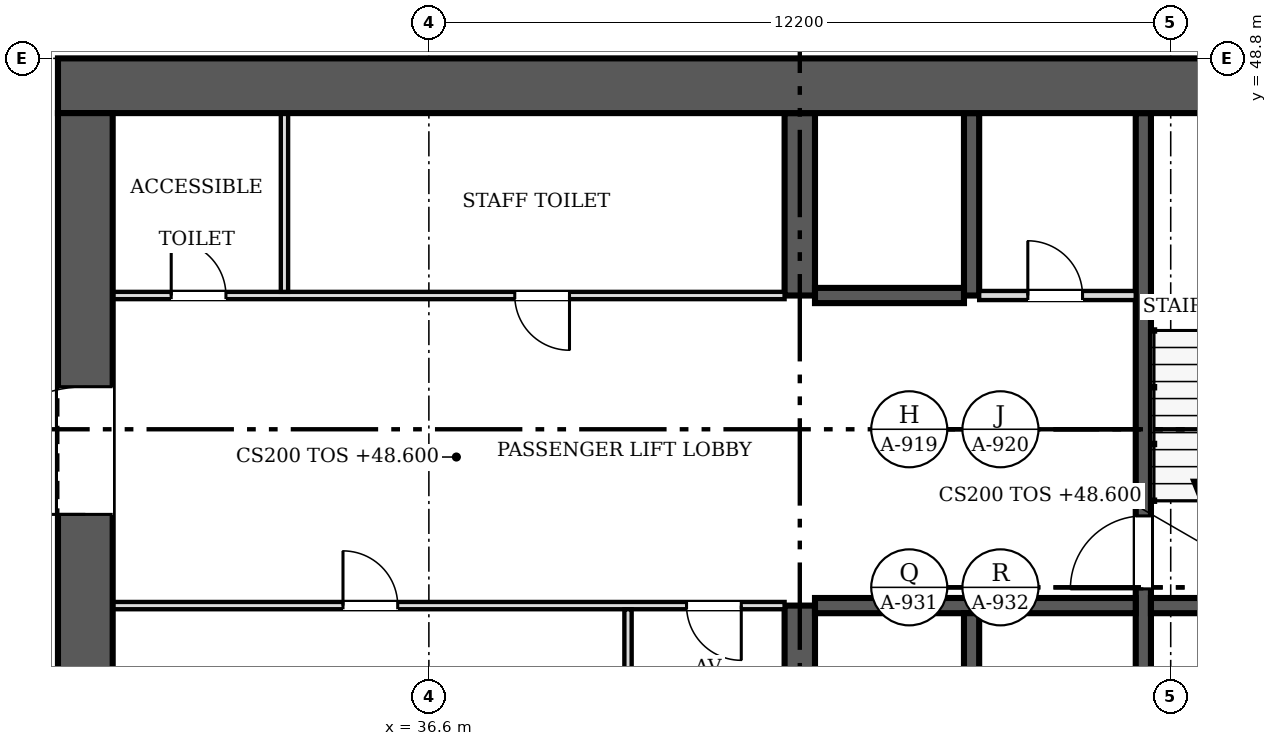
"""IFC4 building model, lengths in metres.
Left out: names, types, materials, properties, quantities, classifications, styles, units other than length and angle.
Written with IfcOpenShell. Run it as: python <this file> out.ifc"""

import sys

from ifc_helpers import new_model, si_unit, direction, frame, frame_2d, origin, place, context, subcontext, project, spatial, rectangle, extrude, source, transform, mapped, element, fill, save


model = new_model("IFC4")
c1 = context("Model", 3, precision=1e-05, world=origin(), true_north=direction((0.0, 1.0)))
c2 = subcontext(c1, "Body", "Model", "MODEL_VIEW")
j1 = project(units=[si_unit("LENGTHUNIT", "METRE"), si_unit("PLANEANGLEUNIT", "RADIAN")], contexts=[c1])
p1 = place(None, origin())
s1 = spatial("IfcSite", under=j1, at=p1, CompositionType="ELEMENT")
p2 = place(p1, origin())
s2 = spatial("IfcBuilding", under=s1, at=p2, CompositionType="ELEMENT")
p3 = place(p2, frame((0.0, 0.0, 48.6)))
s3 = spatial("IfcBuildingStorey", under=s2, at=p3, CompositionType="ELEMENT", Elevation=48.6)
p4 = place(p3, frame((30.95, 25.3, 0.0), z_axis=(0.0, 0.0, 1.0), x_axis=(0.0, 1.0, 0.0)))
e1 = element("IfcWall", 1, at=p4, inside=s3, PredefinedType="SHEAR", context=c2, shape_type="SweptSolid", body=[
    extrude(rectangle(XDim=22.6, YDim=0.9, at=frame_2d((11.3, 0.0))), origin(), (0.0, 0.0, 1.0), 3.8),
])
m1 = source(origin(), c2, "Body", "SweptSolid", [
    extrude(rectangle(XDim=2.1, YDim=2.4, at=frame_2d((1.05, 1.2))), frame((0.0, 0.46, 0.0), z_axis=(0.0, -1.0, 0.0), x_axis=(1.0, 0.0, 0.0)), (0.0, 0.0, 1.0), 0.92),
])
p5 = place(p4, frame((4.5, 0.0, 0.0)))
e2 = element("IfcOpeningElement", 2, at=p5, cuts=e1, PredefinedType="OPENING", context=c2, shape_type="MappedRepresentation", body=[
    mapped(m1, transform((0.0, 0.0, 0.0), scale=1.0)),
])
p6 = place(p4, frame((16.0, 0.0, 0.0)))
e3 = element("IfcOpeningElement", 3, at=p6, cuts=e1, PredefinedType="OPENING", context=c2, shape_type="MappedRepresentation", body=[
    mapped(m1, transform((0.0, 0.0, 0.0), scale=1.0)),
])
p7 = place(p3, frame((30.5, 48.35, 0.0), z_axis=(0.0, 0.0, 1.0), x_axis=(1.0, 0.0, 0.0)))
e4 = element("IfcWall", 4, at=p7, inside=s3, PredefinedType="SHEAR", context=c2, shape_type="SweptSolid", body=[
    extrude(rectangle(XDim=24.4, YDim=0.9, at=frame_2d((12.2, 0.0))), origin(), (0.0, 0.0, 1.0), 3.8),
])
p8 = place(p3, frame((42.7, 36.85, 0.0), z_axis=(0.0, 0.0, 1.0), x_axis=(0.0, 1.0, 0.0)))
e5 = element("IfcWall", 5, at=p8, inside=s3, PredefinedType="SHEAR", context=c2, shape_type="SweptSolid", body=[
    extrude(rectangle(XDim=2.95, YDim=0.5, at=frame_2d((1.475, 0.0))), origin(), (0.0, 0.0, 1.0), 3.8),
])
p9 = place(p3, frame((42.7, 44.9, 0.0), z_axis=(0.0, 0.0, 1.0), x_axis=(0.0, 1.0, 0.0)))
e6 = element("IfcWall", 6, at=p9, inside=s3, PredefinedType="SHEAR", context=c2, shape_type="SweptSolid", body=[
    extrude(rectangle(XDim=3.0, YDim=0.5, at=frame_2d((1.5, 0.0))), origin(), (0.0, 0.0, 1.0), 3.8),
])
p10 = place(p3, frame((48.35, 47.9, 0.0), z_axis=(0.0, 0.0, 1.0), x_axis=(0.0, -1.0, 0.0)))
e7 = element("IfcWall", 7, at=p10, inside=s3, PredefinedType="SOLIDWALL", context=c2, shape_type="SweptSolid", body=[
    extrude(rectangle(XDim=11.05, YDim=0.25, at=frame_2d((5.525, 0.0))), origin(), (0.0, 0.0, 1.0), 3.8),
])
m2 = source(origin(), c2, "Body", "SweptSolid", [
    extrude(rectangle(XDim=1.2, YDim=2.1, at=frame_2d((0.6, 1.05))), frame((0.0, 0.135, 0.0), z_axis=(0.0, -1.0, 0.0), x_axis=(1.0, 0.0, 0.0)), (0.0, 0.0, 1.0), 0.27),
])
p11 = place(p10, frame((6.625, 0.0, 0.0)))
e8 = element("IfcOpeningElement", 8, at=p11, cuts=e7, PredefinedType="OPENING", context=c2, shape_type="MappedRepresentation", body=[
    mapped(m2, transform((0.0, 0.0, 0.0), scale=1.0)),
])
p12 = place(p3, frame((42.95, 39.8, 0.0), z_axis=(0.0, 0.0, 1.0), x_axis=(1.0, 0.0, 0.0)))
e9 = element("IfcWall", 9, at=p12, inside=s3, PredefinedType="SOLIDWALL", context=c2, shape_type="SweptSolid", body=[
    extrude(rectangle(XDim=5.275, YDim=0.25, at=frame_2d((2.638, 0.0))), origin(), (0.0, 0.0, 1.0), 3.8),
])
p13 = place(p3, frame((48.475, 39.8, 0.0), z_axis=(0.0, 0.0, 1.0), x_axis=(1.0, 0.0, 0.0)))
e10 = element("IfcWall", 10, at=p13, inside=s3, PredefinedType="SOLIDWALL", context=c2, shape_type="SweptSolid", body=[
    extrude(rectangle(XDim=3.525, YDim=0.25, at=frame_2d((1.762, 0.0))), origin(), (0.0, 0.0, 1.0), 3.8),
])
p14 = place(p3, frame((45.525, 36.85, 0.0), z_axis=(0.0, 0.0, 1.0), x_axis=(0.0, 1.0, 0.0)))
e11 = element("IfcWall", 11, at=p14, inside=s3, PredefinedType="SOLIDWALL", context=c2, shape_type="SweptSolid", body=[
    extrude(rectangle(XDim=2.825, YDim=0.25, at=frame_2d((1.413, 0.0))), origin(), (0.0, 0.0, 1.0), 3.8),
])
p15 = place(p3, frame((45.525, 44.9, 0.0), z_axis=(0.0, 0.0, 1.0), x_axis=(0.0, 1.0, 0.0)))
e12 = element("IfcWall", 12, at=p15, inside=s3, PredefinedType="SOLIDWALL", context=c2, shape_type="SweptSolid", body=[
    extrude(rectangle(XDim=3.0, YDim=0.25, at=frame_2d((1.5, 0.0))), origin(), (0.0, 0.0, 1.0), 3.8),
])
p16 = place(p3, frame((42.95, 44.9, 0.0), z_axis=(0.0, 0.0, 1.0), x_axis=(1.0, 0.0, 0.0)))
e13 = element("IfcWall", 13, at=p16, inside=s3, PredefinedType="SOLIDWALL", context=c2, shape_type="SweptSolid", body=[
    extrude(rectangle(XDim=2.45, YDim=0.25, at=frame_2d((1.225, 0.0))), origin(), (0.0, 0.0, 1.0), 3.8),
])
p17 = place(p3, frame((42.45, 39.8, 0.0), z_axis=(0.0, 0.0, 1.0), x_axis=(-1.0, 0.0, 0.0)))
e14 = element("IfcWall", 14, at=p17, inside=s3, PredefinedType="PARTITIONING", context=c2, shape_type="SweptSolid", body=[
    extrude(rectangle(XDim=11.05, YDim=0.12, at=frame_2d((5.525, 0.0))), origin(), (0.0, 0.0, 1.0), 3.6),
])
m3 = source(origin(), c2, "Body", "SweptSolid", [
    extrude(rectangle(XDim=0.9, YDim=2.1, at=frame_2d((0.45, 1.05))), frame((0.0, 0.07, 0.0), z_axis=(0.0, -1.0, 0.0), x_axis=(1.0, 0.0, 0.0)), (0.0, 0.0, 1.0), 0.14),
])
p18 = place(p17, frame((6.363, 0.0, 0.0)))
e15 = element("IfcOpeningElement", 15, at=p18, cuts=e14, PredefinedType="OPENING", context=c2, shape_type="MappedRepresentation", body=[
    mapped(m3, transform((0.0, 0.0, 0.0), scale=1.0)),
])
p19 = place(p17, frame((0.712, 0.0, 0.0)))
e16 = element("IfcOpeningElement", 16, at=p19, cuts=e14, PredefinedType="OPENING", context=c2, shape_type="MappedRepresentation", body=[
    mapped(m3, transform((0.0, 0.0, 0.0), scale=1.0)),
])
p20 = place(p3, frame((31.4, 44.9, 0.0), z_axis=(0.0, 0.0, 1.0), x_axis=(1.0, 0.0, 0.0)))
e17 = element("IfcWall", 17, at=p20, inside=s3, PredefinedType="PARTITIONING", context=c2, shape_type="SweptSolid", body=[
    extrude(rectangle(XDim=11.05, YDim=0.12, at=frame_2d((5.525, 0.0))), origin(), (0.0, 0.0, 1.0), 3.6),
])
p21 = place(p20, frame((0.962, 0.0, 0.0)))
e18 = element("IfcOpeningElement", 18, at=p21, cuts=e17, PredefinedType="OPENING", context=c2, shape_type="MappedRepresentation", body=[
    mapped(m3, transform((0.0, 0.0, 0.0), scale=1.0)),
])
p22 = place(p20, frame((6.613, 0.0, 0.0)))
e19 = element("IfcOpeningElement", 19, at=p22, cuts=e17, PredefinedType="OPENING", context=c2, shape_type="MappedRepresentation", body=[
    mapped(m3, transform((0.0, 0.0, 0.0), scale=1.0)),
])
p23 = place(p3, frame((39.875, 36.85, 0.0), z_axis=(0.0, 0.0, 1.0), x_axis=(0.0, 1.0, 0.0)))
e20 = element("IfcWall", 20, at=p23, inside=s3, PredefinedType="PARTITIONING", context=c2, shape_type="SweptSolid", body=[
    extrude(rectangle(XDim=2.89, YDim=0.12, at=frame_2d((1.445, 0.0))), origin(), (0.0, 0.0, 1.0), 3.6),
])
p24 = place(p3, frame((34.225, 44.96, 0.0), z_axis=(0.0, 0.0, 1.0), x_axis=(0.0, 1.0, 0.0)))
e21 = element("IfcWall", 21, at=p24, inside=s3, PredefinedType="PARTITIONING", context=c2, shape_type="SweptSolid", body=[
    extrude(rectangle(XDim=2.94, YDim=0.12, at=frame_2d((1.47, 0.0))), origin(), (0.0, 0.0, 1.0), 3.6),
])
p25 = place(p3, frame((45.65, 44.9, 0.0), z_axis=(0.0, 0.0, 1.0), x_axis=(1.0, 0.0, 0.0)))
e22 = element("IfcWall", 22, at=p25, inside=s3, PredefinedType="PARTITIONING", context=c2, shape_type="SweptSolid", body=[
    extrude(rectangle(XDim=2.575, YDim=0.15, at=frame_2d((1.288, 0.0))), origin(), (0.0, 0.0, 1.0), 3.6),
])
m4 = source(origin(), c2, "Body", "SweptSolid", [
    extrude(rectangle(XDim=0.9, YDim=2.1, at=frame_2d((0.45, 1.05))), frame((0.0, 0.085, 0.0), z_axis=(0.0, -1.0, 0.0), x_axis=(1.0, 0.0, 0.0)), (0.0, 0.0, 1.0), 0.17),
])
p26 = place(p25, frame((0.8, 0.0, 0.0)))
e23 = element("IfcOpeningElement", 23, at=p26, cuts=e22, PredefinedType="OPENING", context=c2, shape_type="MappedRepresentation", body=[
    mapped(m4, transform((0.0, 0.0, 0.0), scale=1.0)),
])
m5 = source(origin(), c2, "Body", "SweptSolid", [
    extrude(rectangle(XDim=2.1, YDim=2.4, at=frame_2d((1.05, 1.2))), frame((0.0, 0.025, 0.0), z_axis=(0.0, -1.0, 0.0), x_axis=(1.0, 0.0, 0.0)), (0.0, 0.0, 1.0), 0.05),
])
p27 = place(p6, origin())
e24 = element("IfcDoor", 24, at=p27, inside=s3, OperationType="DOUBLE_DOOR_SINGLE_SWING", PredefinedType="DOOR", context=c2, shape_type="MappedRepresentation", body=[
    mapped(m5, transform((0.0, 0.0, 0.0), scale=1.0)),
])
fill(e3, e24)
m6 = source(origin(), c2, "Body", "SweptSolid", [
    extrude(rectangle(XDim=1.2, YDim=2.1, at=frame_2d((0.6, 1.05))), frame((0.0, 0.025, 0.0), z_axis=(0.0, -1.0, 0.0), x_axis=(1.0, 0.0, 0.0)), (0.0, 0.0, 1.0), 0.05),
])
p28 = place(p11, origin())
e25 = element("IfcDoor", 25, at=p28, inside=s3, OperationType="SINGLE_SWING_RIGHT", PredefinedType="DOOR", context=c2, shape_type="MappedRepresentation", body=[
    mapped(m6, transform((0.0, 0.0, 0.0), scale=1.0)),
])
fill(e8, e25)
m7 = source(origin(), c2, "Body", "SweptSolid", [
    extrude(rectangle(XDim=0.9, YDim=2.1, at=frame_2d((0.45, 1.05))), frame((0.0, 0.025, 0.0), z_axis=(0.0, -1.0, 0.0), x_axis=(1.0, 0.0, 0.0)), (0.0, 0.0, 1.0), 0.05),
])
p29 = place(p18, origin())
e26 = element("IfcDoor", 26, at=p29, inside=s3, OperationType="SINGLE_SWING_RIGHT", PredefinedType="DOOR", context=c2, shape_type="MappedRepresentation", body=[
    mapped(m7, transform((0.0, 0.0, 0.0), scale=1.0)),
])
fill(e15, e26)
p30 = place(p19, origin())
e27 = element("IfcDoor", 27, at=p30, inside=s3, OperationType="SINGLE_SWING_LEFT", PredefinedType="DOOR", context=c2, shape_type="MappedRepresentation", body=[
    mapped(m7, transform((0.0, 0.0, 0.0), scale=1.0)),
])
fill(e16, e27)
p31 = place(p21, origin())
e28 = element("IfcDoor", 28, at=p31, inside=s3, OperationType="SINGLE_SWING_LEFT", PredefinedType="DOOR", context=c2, shape_type="MappedRepresentation", body=[
    mapped(m7, transform((0.0, 0.0, 0.0), scale=1.0)),
])
fill(e18, e28)
p32 = place(p22, origin())
e29 = element("IfcDoor", 29, at=p32, inside=s3, OperationType="SINGLE_SWING_RIGHT", PredefinedType="DOOR", context=c2, shape_type="MappedRepresentation", body=[
    mapped(m7, transform((0.0, 0.0, 0.0), scale=1.0)),
])
fill(e19, e29)
p33 = place(p26, origin())
e30 = element("IfcDoor", 30, at=p33, inside=s3, OperationType="SINGLE_SWING_LEFT", PredefinedType="DOOR", context=c2, shape_type="MappedRepresentation", body=[
    mapped(m7, transform((0.0, 0.0, 0.0), scale=1.0)),
])
fill(e23, e30)
save(model, sys.argv[1])
